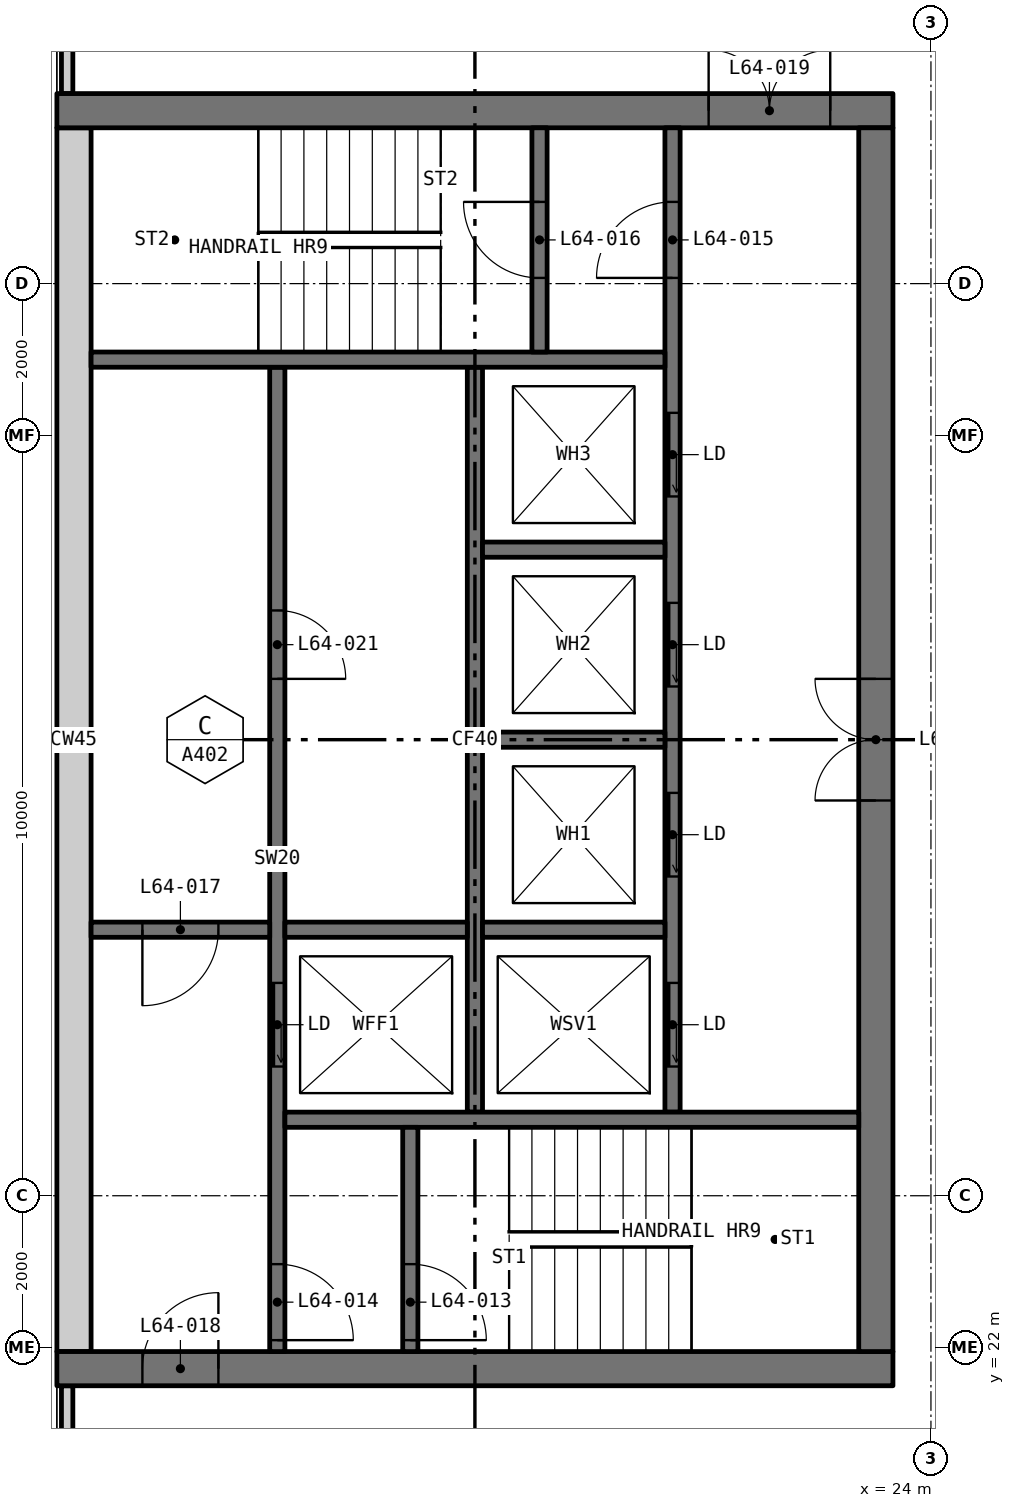
"""IFC4 building model, lengths in metres.
Left out: names, types, materials, properties, quantities, classifications, styles, units other than length and angle.
Written with IfcOpenShell. Run it as: python <this file> out.ifc"""

import sys

from ifc_helpers import new_model, si_unit, direction, frame, frame_2d, origin, place, context, subcontext, project, spatial, rectangle, extrude, element, fill, save


model = new_model("IFC4")
c1 = context("Model", 3, precision=1e-05, world=origin(), true_north=direction((0.0, 1.0)))
c2 = subcontext(c1, "Body", "Model", "MODEL_VIEW")
j1 = project(units=[si_unit("LENGTHUNIT", "METRE"), si_unit("PLANEANGLEUNIT", "RADIAN")], contexts=[c1])
p1 = place(None, origin())
s1 = spatial("IfcSite", under=j1, at=p1, CompositionType="ELEMENT")
p2 = place(p1, origin())
s2 = spatial("IfcBuilding", under=s1, at=p2, CompositionType="ELEMENT")
p3 = place(p2, frame((0.0, 0.0, 238.65)))
s3 = spatial("IfcBuildingStorey", under=s2, at=p3, CompositionType="ELEMENT", Elevation=238.65)
for number, where, z_axis, x_axis in (
    (1, (12.635, 18.71, 0.0), (0.0, 0.0, 1.0), (0.0, 1.0, 0.0)),
    (2, (12.635, 38.5, 0.0), (0.0, 0.0, 1.0), (0.0, 1.0, 0.0)),
):
    element("IfcWall", number, at=place(p3, frame(where, z_axis=z_axis, x_axis=x_axis)), inside=s3, PredefinedType="ELEMENTEDWALL", context=c2, shape_type="SweptSolid", body=[
        extrude(rectangle(XDim=2.79, YDim=0.15, at=frame_2d((1.395, 0.0))), origin(), (0.0, 0.0, 1.0), 3.05),
    ])
p4 = place(p3, frame((12.5, 21.725, 0.0), z_axis=(0.0, 0.0, 1.0), x_axis=(1.0, 0.0, 0.0)))
e3 = element("IfcWall", 3, at=p4, inside=s3, PredefinedType="SHEAR", context=c2, shape_type="SweptSolid", body=[
    extrude(rectangle(XDim=11.0, YDim=0.45, at=frame_2d((5.5, 0.0))), origin(), (0.0, 0.0, 1.0), 3.05),
])
p5 = place(p4, frame((1.125, 0.0, 0.0)))
e4 = element("IfcOpeningElement", 4, at=p5, cuts=e3, PredefinedType="OPENING", context=c2, shape_type="SweptSolid", body=[
    extrude(rectangle(XDim=1.0, YDim=2.1, at=frame_2d((0.5, 1.05))), frame((0.0, 0.235, 0.0), z_axis=(0.0, -1.0, 0.0), x_axis=(1.0, 0.0, 0.0)), (0.0, 0.0, 1.0), 0.47),
])
p6 = place(p3, frame((12.5, 38.275, 0.0), z_axis=(0.0, 0.0, 1.0), x_axis=(1.0, 0.0, 0.0)))
e5 = element("IfcWall", 5, at=p6, inside=s3, PredefinedType="SHEAR", context=c2, shape_type="SweptSolid", body=[
    extrude(rectangle(XDim=11.0, YDim=0.45, at=frame_2d((5.5, 0.0))), origin(), (0.0, 0.0, 1.0), 3.05),
])
p7 = place(p6, frame((8.575, 0.0, 0.0)))
e6 = element("IfcOpeningElement", 6, at=p7, cuts=e5, PredefinedType="OPENING", context=c2, shape_type="SweptSolid", body=[
    extrude(rectangle(XDim=1.6, YDim=2.1, at=frame_2d((0.8, 1.05))), frame((0.0, 0.235, 0.0), z_axis=(0.0, -1.0, 0.0), x_axis=(1.0, 0.0, 0.0)), (0.0, 0.0, 1.0), 0.47),
])
p8 = place(p3, frame((12.725, 21.95, 0.0), z_axis=(0.0, 0.0, 1.0), x_axis=(0.0, 1.0, 0.0)))
e7 = element("IfcWall", 7, at=p8, inside=s3, PredefinedType="SHEAR", context=c2, shape_type="SweptSolid", body=[
    extrude(rectangle(XDim=16.1, YDim=0.45, at=frame_2d((8.05, 0.0))), origin(), (0.0, 0.0, 1.0), 3.05),
])
p9 = place(p3, frame((23.275, 21.95, 0.0), z_axis=(0.0, 0.0, 1.0), x_axis=(0.0, 1.0, 0.0)))
e8 = element("IfcWall", 8, at=p9, inside=s3, PredefinedType="SHEAR", context=c2, shape_type="SweptSolid", body=[
    extrude(rectangle(XDim=16.1, YDim=0.45, at=frame_2d((8.05, 0.0))), origin(), (0.0, 0.0, 1.0), 3.05),
])
p10 = place(p9, frame((7.25, 0.0, 0.0)))
e9 = element("IfcOpeningElement", 9, at=p10, cuts=e8, PredefinedType="OPENING", context=c2, shape_type="SweptSolid", body=[
    extrude(rectangle(XDim=1.6, YDim=2.1, at=frame_2d((0.8, 1.05))), frame((0.0, 0.235, 0.0), z_axis=(0.0, -1.0, 0.0), x_axis=(1.0, 0.0, 0.0)), (0.0, 0.0, 1.0), 0.47),
])
p11 = place(p3, frame((15.4, 21.95, 0.0), z_axis=(0.0, 0.0, 1.0), x_axis=(0.0, 1.0, 0.0)))
e10 = element("IfcWall", 10, at=p11, inside=s3, PredefinedType="SOLIDWALL", context=c2, shape_type="SweptSolid", body=[
    extrude(rectangle(XDim=12.95, YDim=0.2, at=frame_2d((6.475, 0.0))), origin(), (0.0, 0.0, 1.0), 3.05),
])
p12 = place(p11, frame((3.75, 0.0, 0.0)))
e11 = element("IfcOpeningElement", 11, at=p12, cuts=e10, PredefinedType="OPENING", context=c2, shape_type="SweptSolid", body=[
    extrude(rectangle(XDim=1.1, YDim=2.1, at=frame_2d((0.55, 1.05))), frame((0.0, 0.11, 0.0), z_axis=(0.0, -1.0, 0.0), x_axis=(1.0, 0.0, 0.0)), (0.0, 0.0, 1.0), 0.22),
])
p13 = place(p11, frame((0.15, 0.0, 0.0)))
e12 = element("IfcOpeningElement", 12, at=p13, cuts=e10, PredefinedType="OPENING", context=c2, shape_type="SweptSolid", body=[
    extrude(rectangle(XDim=1.0, YDim=2.1, at=frame_2d((0.5, 1.05))), frame((0.0, 0.11, 0.0), z_axis=(0.0, -1.0, 0.0), x_axis=(1.0, 0.0, 0.0)), (0.0, 0.0, 1.0), 0.22),
])
p14 = place(p11, frame((8.85, 0.0, 0.0)))
e13 = element("IfcOpeningElement", 13, at=p14, cuts=e10, PredefinedType="OPENING", context=c2, shape_type="SweptSolid", body=[
    extrude(rectangle(XDim=0.9, YDim=2.1, at=frame_2d((0.45, 1.05))), frame((0.0, 0.11, 0.0), z_axis=(0.0, -1.0, 0.0), x_axis=(1.0, 0.0, 0.0)), (0.0, 0.0, 1.0), 0.22),
])
p15 = place(p3, frame((20.6, 25.1, 0.0), z_axis=(0.0, 0.0, 1.0), x_axis=(0.0, 1.0, 0.0)))
e14 = element("IfcWall", 14, at=p15, inside=s3, PredefinedType="SOLIDWALL", context=c2, shape_type="SweptSolid", body=[
    extrude(rectangle(XDim=12.95, YDim=0.2, at=frame_2d((6.475, 0.0))), origin(), (0.0, 0.0, 1.0), 3.05),
])
p16 = place(p15, frame((0.6, 0.0, 0.0)))
e15 = element("IfcOpeningElement", 15, at=p16, cuts=e14, PredefinedType="OPENING", context=c2, shape_type="SweptSolid", body=[
    extrude(rectangle(XDim=1.1, YDim=2.1, at=frame_2d((0.55, 1.05))), frame((0.0, 0.11, 0.0), z_axis=(0.0, -1.0, 0.0), x_axis=(1.0, 0.0, 0.0)), (0.0, 0.0, 1.0), 0.22),
])
p17 = place(p15, frame((3.1, 0.0, 0.0)))
e16 = element("IfcOpeningElement", 16, at=p17, cuts=e14, PredefinedType="OPENING", context=c2, shape_type="SweptSolid", body=[
    extrude(rectangle(XDim=1.1, YDim=2.1, at=frame_2d((0.55, 1.05))), frame((0.0, 0.11, 0.0), z_axis=(0.0, -1.0, 0.0), x_axis=(1.0, 0.0, 0.0)), (0.0, 0.0, 1.0), 0.22),
])
p18 = place(p15, frame((5.6, 0.0, 0.0)))
e17 = element("IfcOpeningElement", 17, at=p18, cuts=e14, PredefinedType="OPENING", context=c2, shape_type="SweptSolid", body=[
    extrude(rectangle(XDim=1.1, YDim=2.1, at=frame_2d((0.55, 1.05))), frame((0.0, 0.11, 0.0), z_axis=(0.0, -1.0, 0.0), x_axis=(1.0, 0.0, 0.0)), (0.0, 0.0, 1.0), 0.22),
])
p19 = place(p15, frame((8.1, 0.0, 0.0)))
e18 = element("IfcOpeningElement", 18, at=p19, cuts=e14, PredefinedType="OPENING", context=c2, shape_type="SweptSolid", body=[
    extrude(rectangle(XDim=1.1, YDim=2.1, at=frame_2d((0.55, 1.05))), frame((0.0, 0.11, 0.0), z_axis=(0.0, -1.0, 0.0), x_axis=(1.0, 0.0, 0.0)), (0.0, 0.0, 1.0), 0.22),
])
p20 = place(p15, frame((10.975, 0.0, 0.0)))
e19 = element("IfcOpeningElement", 19, at=p20, cuts=e14, PredefinedType="OPENING", context=c2, shape_type="SweptSolid", body=[
    extrude(rectangle(XDim=1.0, YDim=2.1, at=frame_2d((0.5, 1.05))), frame((0.0, 0.11, 0.0), z_axis=(0.0, -1.0, 0.0), x_axis=(1.0, 0.0, 0.0)), (0.0, 0.0, 1.0), 0.22),
])
p21 = place(p3, frame((18.0, 25.1, 0.0), z_axis=(0.0, 0.0, 1.0), x_axis=(0.0, 1.0, 0.0)))
e20 = element("IfcWall", 20, at=p21, inside=s3, PredefinedType="SOLIDWALL", context=c2, shape_type="SweptSolid", body=[
    extrude(rectangle(XDim=9.8, YDim=0.2, at=frame_2d((4.9, 0.0))), origin(), (0.0, 0.0, 1.0), 3.05),
])
for number, where, z_axis, x_axis in (
    (21, (15.5, 25.0, 0.0), (0.0, 0.0, 1.0), (1.0, 0.0, 0.0)),
    (22, (12.95, 35.0, 0.0), (0.0, 0.0, 1.0), (1.0, 0.0, 0.0)),
):
    element("IfcWall", number, at=place(p3, frame(where, z_axis=z_axis, x_axis=x_axis)), inside=s3, PredefinedType="SOLIDWALL", context=c2, shape_type="SweptSolid", body=[
        extrude(rectangle(XDim=7.55, YDim=0.2, at=frame_2d((3.775, 0.0))), origin(), (0.0, 0.0, 1.0), 3.05),
    ])
p22 = place(p3, frame((12.95, 27.5, 0.0), z_axis=(0.0, 0.0, 1.0), x_axis=(1.0, 0.0, 0.0)))
e23 = element("IfcWall", 23, at=p22, inside=s3, PredefinedType="SOLIDWALL", context=c2, shape_type="SweptSolid", body=[
    extrude(rectangle(XDim=2.35, YDim=0.2, at=frame_2d((1.175, 0.0))), origin(), (0.0, 0.0, 1.0), 3.05),
])
p23 = place(p22, frame((0.675, 0.0, 0.0)))
e24 = element("IfcOpeningElement", 24, at=p23, cuts=e23, PredefinedType="OPENING", context=c2, shape_type="SweptSolid", body=[
    extrude(rectangle(XDim=1.0, YDim=2.1, at=frame_2d((0.5, 1.05))), frame((0.0, 0.11, 0.0), z_axis=(0.0, -1.0, 0.0), x_axis=(1.0, 0.0, 0.0)), (0.0, 0.0, 1.0), 0.22),
])
p24 = place(p3, frame((17.15, 21.95, 0.0), z_axis=(0.0, 0.0, 1.0), x_axis=(0.0, 1.0, 0.0)))
e25 = element("IfcWall", 25, at=p24, inside=s3, PredefinedType="SOLIDWALL", context=c2, shape_type="SweptSolid", body=[
    extrude(rectangle(XDim=2.95, YDim=0.2, at=frame_2d((1.475, 0.0))), origin(), (0.0, 0.0, 1.0), 3.05),
])
p25 = place(p24, frame((0.15, 0.0, 0.0)))
e26 = element("IfcOpeningElement", 26, at=p25, cuts=e25, PredefinedType="OPENING", context=c2, shape_type="SweptSolid", body=[
    extrude(rectangle(XDim=1.0, YDim=2.1, at=frame_2d((0.5, 1.05))), frame((0.0, 0.11, 0.0), z_axis=(0.0, -1.0, 0.0), x_axis=(1.0, 0.0, 0.0)), (0.0, 0.0, 1.0), 0.22),
])
p26 = place(p3, frame((18.85, 35.1, 0.0), z_axis=(0.0, 0.0, 1.0), x_axis=(0.0, 1.0, 0.0)))
e27 = element("IfcWall", 27, at=p26, inside=s3, PredefinedType="SOLIDWALL", context=c2, shape_type="SweptSolid", body=[
    extrude(rectangle(XDim=2.95, YDim=0.2, at=frame_2d((1.475, 0.0))), origin(), (0.0, 0.0, 1.0), 3.05),
])
p27 = place(p26, frame((0.975, 0.0, 0.0)))
e28 = element("IfcOpeningElement", 28, at=p27, cuts=e27, PredefinedType="OPENING", context=c2, shape_type="SweptSolid", body=[
    extrude(rectangle(XDim=1.0, YDim=2.1, at=frame_2d((0.5, 1.05))), frame((0.0, 0.11, 0.0), z_axis=(0.0, -1.0, 0.0), x_axis=(1.0, 0.0, 0.0)), (0.0, 0.0, 1.0), 0.22),
])
for number, where, z_axis, x_axis in (
    (29, (15.5, 27.5, 0.0), (0.0, 0.0, 1.0), (1.0, 0.0, 0.0)),
    (30, (18.1, 27.5, 0.0), (0.0, 0.0, 1.0), (1.0, 0.0, 0.0)),
    (31, (18.1, 30.0, 0.0), (0.0, 0.0, 1.0), (1.0, 0.0, 0.0)),
    (32, (18.1, 32.5, 0.0), (0.0, 0.0, 1.0), (1.0, 0.0, 0.0)),
):
    element("IfcWall", number, at=place(p3, frame(where, z_axis=z_axis, x_axis=x_axis)), inside=s3, PredefinedType="SOLIDWALL", context=c2, shape_type="SweptSolid", body=[
        extrude(rectangle(XDim=2.4, YDim=0.2, at=frame_2d((1.2, 0.0))), origin(), (0.0, 0.0, 1.0), 3.05),
    ])
p28 = place(p16, origin())
e33 = element("IfcDoor", 33, at=p28, inside=s3, OperationType="SLIDING_TO_LEFT", PredefinedType="DOOR", context=c2, shape_type="SweptSolid", body=[
    extrude(rectangle(XDim=1.1, YDim=2.1, at=frame_2d((0.55, 1.05))), frame((0.0, 0.025, 0.0), z_axis=(0.0, -1.0, 0.0), x_axis=(1.0, 0.0, 0.0)), (0.0, 0.0, 1.0), 0.05),
])
fill(e15, e33)
p29 = place(p17, origin())
e34 = element("IfcDoor", 34, at=p29, inside=s3, OperationType="SLIDING_TO_LEFT", PredefinedType="DOOR", context=c2, shape_type="SweptSolid", body=[
    extrude(rectangle(XDim=1.1, YDim=2.1, at=frame_2d((0.55, 1.05))), frame((0.0, 0.025, 0.0), z_axis=(0.0, -1.0, 0.0), x_axis=(1.0, 0.0, 0.0)), (0.0, 0.0, 1.0), 0.05),
])
fill(e16, e34)
p30 = place(p18, origin())
e35 = element("IfcDoor", 35, at=p30, inside=s3, OperationType="SLIDING_TO_LEFT", PredefinedType="DOOR", context=c2, shape_type="SweptSolid", body=[
    extrude(rectangle(XDim=1.1, YDim=2.1, at=frame_2d((0.55, 1.05))), frame((0.0, 0.025, 0.0), z_axis=(0.0, -1.0, 0.0), x_axis=(1.0, 0.0, 0.0)), (0.0, 0.0, 1.0), 0.05),
])
fill(e17, e35)
p31 = place(p19, origin())
e36 = element("IfcDoor", 36, at=p31, inside=s3, OperationType="SLIDING_TO_LEFT", PredefinedType="DOOR", context=c2, shape_type="SweptSolid", body=[
    extrude(rectangle(XDim=1.1, YDim=2.1, at=frame_2d((0.55, 1.05))), frame((0.0, 0.025, 0.0), z_axis=(0.0, -1.0, 0.0), x_axis=(1.0, 0.0, 0.0)), (0.0, 0.0, 1.0), 0.05),
])
fill(e18, e36)
p32 = place(p12, origin())
e37 = element("IfcDoor", 37, at=p32, inside=s3, OperationType="SLIDING_TO_LEFT", PredefinedType="DOOR", context=c2, shape_type="SweptSolid", body=[
    extrude(rectangle(XDim=1.1, YDim=2.1, at=frame_2d((0.55, 1.05))), frame((0.0, 0.025, 0.0), z_axis=(0.0, -1.0, 0.0), x_axis=(1.0, 0.0, 0.0)), (0.0, 0.0, 1.0), 0.05),
])
fill(e11, e37)
p33 = place(p25, frame((1.0, 0.0, 0.0), x_axis=(-1.0, 0.0, 0.0)))
e38 = element("IfcDoor", 38, at=p33, inside=s3, OperationType="SINGLE_SWING_LEFT", PredefinedType="DOOR", context=c2, shape_type="SweptSolid", body=[
    extrude(rectangle(XDim=1.0, YDim=2.1, at=frame_2d((0.5, 1.05))), frame((0.0, 0.025, 0.0), z_axis=(0.0, -1.0, 0.0), x_axis=(1.0, 0.0, 0.0)), (0.0, 0.0, 1.0), 0.05),
])
fill(e26, e38)
p34 = place(p13, frame((1.0, 0.0, 0.0), x_axis=(-1.0, 0.0, 0.0)))
e39 = element("IfcDoor", 39, at=p34, inside=s3, OperationType="SINGLE_SWING_LEFT", PredefinedType="DOOR", context=c2, shape_type="SweptSolid", body=[
    extrude(rectangle(XDim=1.0, YDim=2.1, at=frame_2d((0.5, 1.05))), frame((0.0, 0.025, 0.0), z_axis=(0.0, -1.0, 0.0), x_axis=(1.0, 0.0, 0.0)), (0.0, 0.0, 1.0), 0.05),
])
fill(e12, e39)
p35 = place(p20, origin())
e40 = element("IfcDoor", 40, at=p35, inside=s3, OperationType="SINGLE_SWING_RIGHT", PredefinedType="DOOR", context=c2, shape_type="SweptSolid", body=[
    extrude(rectangle(XDim=1.0, YDim=2.1, at=frame_2d((0.5, 1.05))), frame((0.0, 0.025, 0.0), z_axis=(0.0, -1.0, 0.0), x_axis=(1.0, 0.0, 0.0)), (0.0, 0.0, 1.0), 0.05),
])
fill(e19, e40)
p36 = place(p27, origin())
e41 = element("IfcDoor", 41, at=p36, inside=s3, OperationType="SINGLE_SWING_LEFT", PredefinedType="DOOR", context=c2, shape_type="SweptSolid", body=[
    extrude(rectangle(XDim=1.0, YDim=2.1, at=frame_2d((0.5, 1.05))), frame((0.0, 0.025, 0.0), z_axis=(0.0, -1.0, 0.0), x_axis=(1.0, 0.0, 0.0)), (0.0, 0.0, 1.0), 0.05),
])
fill(e28, e41)
p37 = place(p23, frame((1.0, 0.0, 0.0), x_axis=(-1.0, 0.0, 0.0)))
e42 = element("IfcDoor", 42, at=p37, inside=s3, OperationType="SINGLE_SWING_LEFT", PredefinedType="DOOR", context=c2, shape_type="SweptSolid", body=[
    extrude(rectangle(XDim=1.0, YDim=2.1, at=frame_2d((0.5, 1.05))), frame((0.0, 0.025, 0.0), z_axis=(0.0, -1.0, 0.0), x_axis=(1.0, 0.0, 0.0)), (0.0, 0.0, 1.0), 0.05),
])
fill(e24, e42)
p38 = place(p5, origin())
e43 = element("IfcDoor", 43, at=p38, inside=s3, OperationType="SINGLE_SWING_LEFT", PredefinedType="DOOR", context=c2, shape_type="SweptSolid", body=[
    extrude(rectangle(XDim=1.0, YDim=2.1, at=frame_2d((0.5, 1.05))), frame((0.0, 0.025, 0.0), z_axis=(0.0, -1.0, 0.0), x_axis=(1.0, 0.0, 0.0)), (0.0, 0.0, 1.0), 0.05),
])
fill(e4, e43)
p39 = place(p7, origin())
e44 = element("IfcDoor", 44, at=p39, inside=s3, OperationType="DOUBLE_DOOR_SINGLE_SWING", PredefinedType="DOOR", context=c2, shape_type="SweptSolid", body=[
    extrude(rectangle(XDim=1.6, YDim=2.1, at=frame_2d((0.8, 1.05))), frame((0.0, 0.025, 0.0), z_axis=(0.0, -1.0, 0.0), x_axis=(1.0, 0.0, 0.0)), (0.0, 0.0, 1.0), 0.05),
])
fill(e6, e44)
p40 = place(p10, origin())
e45 = element("IfcDoor", 45, at=p40, inside=s3, OperationType="DOUBLE_DOOR_SINGLE_SWING", PredefinedType="DOOR", context=c2, shape_type="SweptSolid", body=[
    extrude(rectangle(XDim=1.6, YDim=2.1, at=frame_2d((0.8, 1.05))), frame((0.0, 0.025, 0.0), z_axis=(0.0, -1.0, 0.0), x_axis=(1.0, 0.0, 0.0)), (0.0, 0.0, 1.0), 0.05),
])
fill(e9, e45)
p41 = place(p14, frame((0.9, 0.0, 0.0), x_axis=(-1.0, 0.0, 0.0)))
e46 = element("IfcDoor", 46, at=p41, inside=s3, OperationType="SINGLE_SWING_LEFT", PredefinedType="DOOR", context=c2, shape_type="SweptSolid", body=[
    extrude(rectangle(XDim=0.9, YDim=2.1, at=frame_2d((0.45, 1.05))), frame((0.0, 0.025, 0.0), z_axis=(0.0, -1.0, 0.0), x_axis=(1.0, 0.0, 0.0)), (0.0, 0.0, 1.0), 0.05),
])
fill(e13, e46)
save(model, sys.argv[1])
